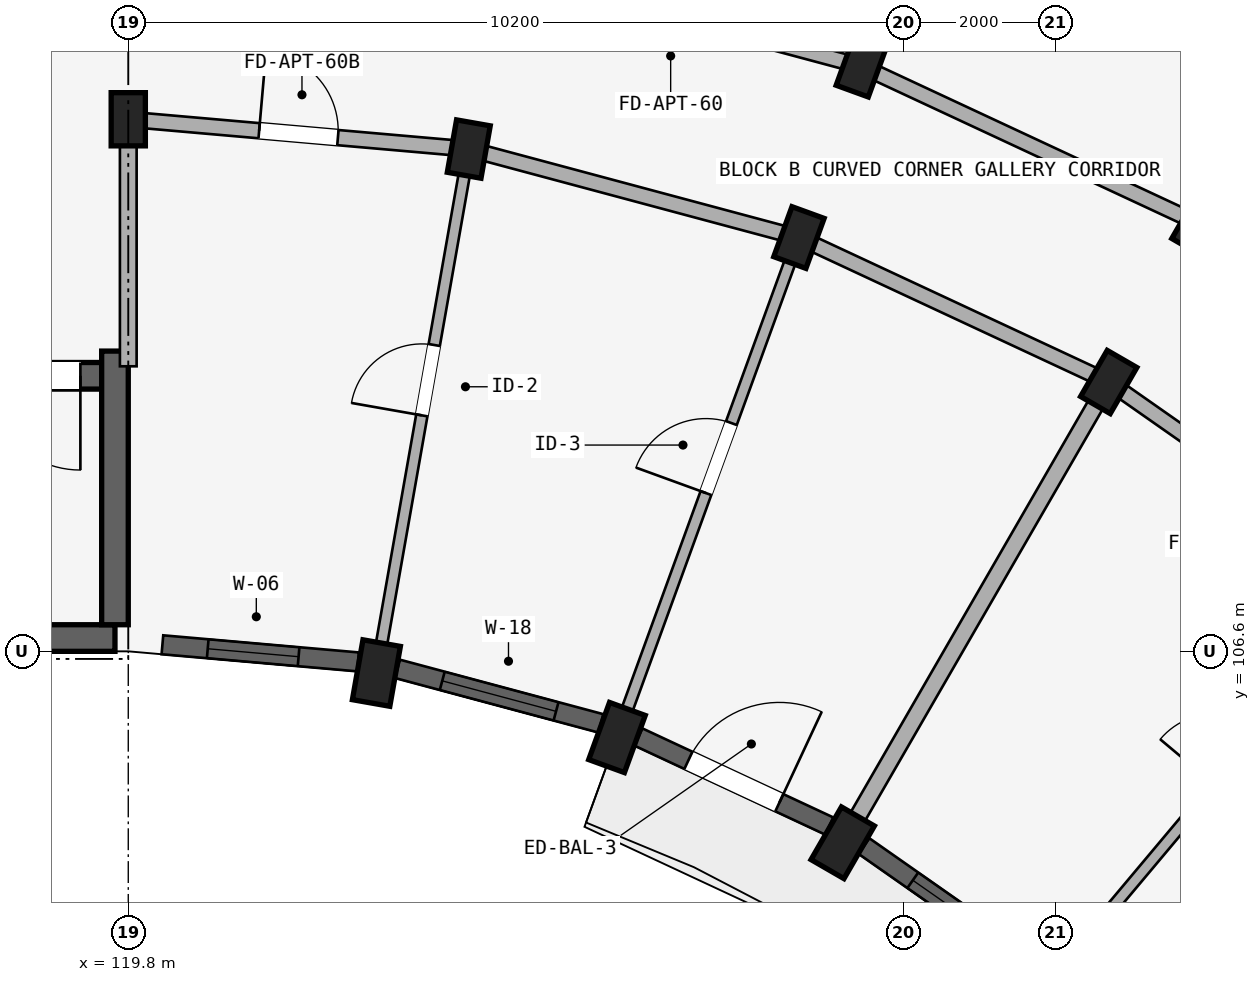
"""IFC4 building model, lengths in metres.
Left out: names, types, materials, properties, quantities, classifications, styles, units other than length and angle.
Written with IfcOpenShell. Run it as: python <this file> out.ifc"""

import sys

from ifc_helpers import new_model, si_unit, direction, frame, frame_2d, origin, origin_2d, place, context, subcontext, project, spatial, rectangle, extrude, element, fill, save


model = new_model("IFC4")
c1 = context("Model", 3, precision=1e-05, world=origin(), true_north=direction((0.0, 1.0)))
c2 = subcontext(c1, "Body", "Model", "MODEL_VIEW")
j1 = project(units=[si_unit("LENGTHUNIT", "METRE"), si_unit("PLANEANGLEUNIT", "RADIAN")], contexts=[c1])
p1 = place(None, origin())
s1 = spatial("IfcSite", under=j1, at=p1, CompositionType="ELEMENT")
p2 = place(p1, origin())
s2 = spatial("IfcBuilding", under=s1, at=p2, CompositionType="ELEMENT")
p3 = place(p2, frame((0.0, 0.0, 18.15)))
s3 = spatial("IfcBuildingStorey", under=s2, at=p3, CompositionType="ELEMENT", Elevation=18.15)
p4 = place(p3, frame((119.625, 106.775, 0.0), z_axis=(0.0, 0.0, 1.0), x_axis=(-1.0, 0.0, 0.0)))
e1 = element("IfcWall", 1, at=p4, inside=s3, PredefinedType="SHEAR", context=c2, shape_type="SweptSolid", body=[
    extrude(rectangle(XDim=8.25, YDim=0.35, at=frame_2d((4.125, 0.0))), origin(), (0.0, 0.0, 1.0), 2.93),
])
p5 = place(p3, frame((119.45, 110.225, 0.0), z_axis=(0.0, 0.0, 1.0), x_axis=(-1.0, 0.0, 0.0)))
e2 = element("IfcWall", 2, at=p5, inside=s3, PredefinedType="SHEAR", context=c2, shape_type="SweptSolid", body=[
    extrude(rectangle(XDim=7.9, YDim=0.35, at=frame_2d((3.95, 0.0))), origin(), (0.0, 0.0, 1.0), 2.93),
])
p6 = place(p5, frame((0.28, 0.0, 0.0)))
e3 = element("IfcOpeningElement", 3, at=p6, cuts=e2, PredefinedType="OPENING", context=c2, shape_type="SweptSolid", body=[
    extrude(rectangle(XDim=1.24, YDim=2.15, at=frame_2d((0.62, 1.075))), frame((0.0, 0.185, 0.0), z_axis=(0.0, -1.0, 0.0), x_axis=(1.0, 0.0, 0.0)), (0.0, 0.0, 1.0), 0.37),
])
p7 = place(p3, frame((119.625, 106.95, 0.0), z_axis=(0.0, 0.0, 1.0), x_axis=(0.0, 1.0, 0.0)))
e4 = element("IfcWall", 4, at=p7, inside=s3, PredefinedType="SHEAR", context=c2, shape_type="SweptSolid", body=[
    extrude(rectangle(XDim=3.6, YDim=0.35, at=frame_2d((1.8, 0.0))), origin(), (0.0, 0.0, 1.0), 2.93),
])
p8 = place(p3, frame((119.8, 113.6, 0.0), z_axis=(0.0, 0.0, 1.0), x_axis=(1.0, 0.0, 0.0)))
e5 = element("IfcColumn", 5, at=p8, inside=s3, PredefinedType="COLUMN", context=c2, shape_type="SweptSolid", body=[
    extrude(rectangle(XDim=0.45, YDim=0.7, at=origin_2d()), origin(), (0.0, 0.0, 1.0), 2.93),
])
p9 = place(p3, frame((123.065, 106.314, 0.0), z_axis=(0.0, 0.0, 1.0), x_axis=(-0.984807753012, 0.173648177667, 0.0)))
e6 = element("IfcColumn", 6, at=p9, inside=s3, PredefinedType="COLUMN", context=c2, shape_type="SweptSolid", body=[
    extrude(rectangle(XDim=0.5, YDim=0.8, at=origin_2d()), origin(), (0.0, 0.0, 1.0), 2.93),
])
p10 = place(p3, frame((124.28, 113.208, 0.0), z_axis=(0.0, 0.0, 1.0), x_axis=(-0.984807753012, 0.173648177667, 0.0)))
e7 = element("IfcColumn", 7, at=p10, inside=s3, PredefinedType="COLUMN", context=c2, shape_type="SweptSolid", body=[
    extrude(rectangle(XDim=0.45, YDim=0.7, at=origin_2d()), origin(), (0.0, 0.0, 1.0), 2.93),
])
p11 = place(p3, frame((126.23, 105.466, 0.0), z_axis=(0.0, 0.0, 1.0), x_axis=(-0.939692620786, 0.342020143326, 0.0)))
e8 = element("IfcColumn", 8, at=p11, inside=s3, PredefinedType="COLUMN", context=c2, shape_type="SweptSolid", body=[
    extrude(rectangle(XDim=0.5, YDim=0.8, at=origin_2d()), origin(), (0.0, 0.0, 1.0), 2.93),
])
for number, where, z_axis, x_axis in (
    (9, (128.624, 112.044, 0.0), (0.0, 0.0, 1.0), (-0.94, 0.342, 0.0)),
    (10, (129.445, 114.299, 0.0), (0.0, 0.0, 1.0), (-0.94, 0.342, 0.0)),
):
    element("IfcColumn", number, at=place(p3, frame(where, z_axis=z_axis, x_axis=x_axis)), inside=s3, PredefinedType="COLUMN", context=c2, shape_type="SweptSolid", body=[
        extrude(rectangle(XDim=0.45, YDim=0.7, at=origin_2d()), origin(), (0.0, 0.0, 1.0), 2.93),
    ])
p12 = place(p3, frame((129.2, 104.081, 0.0), z_axis=(0.0, 0.0, 1.0), x_axis=(-0.866025403784, 0.5, 0.0)))
e11 = element("IfcColumn", 11, at=p12, inside=s3, PredefinedType="COLUMN", context=c2, shape_type="SweptSolid", body=[
    extrude(rectangle(XDim=0.5, YDim=0.8, at=origin_2d()), origin(), (0.0, 0.0, 1.0), 2.93),
])
for number, where, z_axis, x_axis in (
    (12, (132.7, 110.144, 0.0), (0.0, 0.0, 1.0), (-0.866, 0.5, 0.0)),
    (13, (133.9, 112.222, 0.0), (0.0, 0.0, 1.0), (-0.866, 0.5, 0.0)),
):
    element("IfcColumn", number, at=place(p3, frame(where, z_axis=z_axis, x_axis=x_axis)), inside=s3, PredefinedType="COLUMN", context=c2, shape_type="SweptSolid", body=[
        extrude(rectangle(XDim=0.45, YDim=0.7, at=origin_2d()), origin(), (0.0, 0.0, 1.0), 2.93),
    ])
p13 = place(p3, frame((119.8, 113.6, 0.0), z_axis=(0.0, 0.0, 1.0), x_axis=(0.996191949488, -0.087187153726, 0.0)))
e14 = element("IfcWall", 14, at=p13, inside=s3, PredefinedType="STANDARD", context=c2, shape_type="SweptSolid", body=[
    extrude(rectangle(XDim=4.497, YDim=0.2, at=frame_2d((2.249, 0.0))), origin(), (0.0, 0.0, 1.0), 2.372),
])
p14 = place(p13, frame((1.729, 0.0, 0.0)))
e15 = element("IfcOpeningElement", 15, at=p14, cuts=e14, PredefinedType="OPENING", context=c2, shape_type="SweptSolid", body=[
    extrude(rectangle(XDim=1.04, YDim=2.15, at=frame_2d((0.52, 1.075))), frame((0.0, 0.11, 0.0), z_axis=(0.0, -1.0, 0.0), x_axis=(1.0, 0.0, 0.0)), (0.0, 0.0, 1.0), 0.22),
])
p15 = place(p3, frame((124.28, 113.208, 0.0), z_axis=(0.0, 0.0, 1.0), x_axis=(0.965934240054, -0.258787642463, 0.0)))
e16 = element("IfcWall", 16, at=p15, inside=s3, PredefinedType="STANDARD", context=c2, shape_type="SweptSolid", body=[
    extrude(rectangle(XDim=4.497, YDim=0.2, at=frame_2d((2.249, 0.0))), origin(), (0.0, 0.0, 1.0), 2.372),
])
p16 = place(p3, frame((124.697, 115.572, 0.0), z_axis=(0.0, 0.0, 1.0), x_axis=(0.965930095386, -0.258803112091, 0.0)))
e17 = element("IfcWall", 17, at=p16, inside=s3, PredefinedType="STANDARD", context=c2, shape_type="SweptSolid", body=[
    extrude(rectangle(XDim=4.916, YDim=0.2, at=frame_2d((2.458, 0.0))), origin(), (0.0, 0.0, 1.0), 2.372),
])
p17 = place(p16, frame((1.958, 0.0, 0.0)))
e18 = element("IfcOpeningElement", 18, at=p17, cuts=e17, PredefinedType="OPENING", context=c2, shape_type="SweptSolid", body=[
    extrude(rectangle(XDim=1.0, YDim=2.15, at=frame_2d((0.5, 1.075))), frame((0.0, 0.11, 0.0), z_axis=(0.0, -1.0, 0.0), x_axis=(1.0, 0.0, 0.0)), (0.0, 0.0, 1.0), 0.22),
])
p18 = place(p3, frame((128.624, 112.044, 0.0), z_axis=(0.0, 0.0, 1.0), x_axis=(0.906307919131, -0.422617978463, 0.0)))
e19 = element("IfcWall", 19, at=p18, inside=s3, PredefinedType="STANDARD", context=c2, shape_type="SweptSolid", body=[
    extrude(rectangle(XDim=4.497, YDim=0.2, at=frame_2d((2.249, 0.0))), origin(), (0.0, 0.0, 1.0), 2.372),
])
p19 = place(p3, frame((129.445, 114.299, 0.0), z_axis=(0.0, 0.0, 1.0), x_axis=(0.906302381024, -0.422629854778, 0.0)))
e20 = element("IfcWall", 20, at=p19, inside=s3, PredefinedType="STANDARD", context=c2, shape_type="SweptSolid", body=[
    extrude(rectangle(XDim=4.915, YDim=0.2, at=frame_2d((2.458, 0.0))), origin(), (0.0, 0.0, 1.0), 2.372),
])
p20 = place(p3, frame((132.7, 110.144, 0.0), z_axis=(0.0, 0.0, 1.0), x_axis=(0.819155404658, -0.573571637217, 0.0)))
e21 = element("IfcWall", 21, at=p20, inside=s3, PredefinedType="STANDARD", context=c2, shape_type="SweptSolid", body=[
    extrude(rectangle(XDim=4.497, YDim=0.2, at=frame_2d((2.249, 0.0))), origin(), (0.0, 0.0, 1.0), 2.372),
])
p21 = place(p20, frame((1.709, 0.0, 0.0)))
e22 = element("IfcOpeningElement", 22, at=p21, cuts=e21, PredefinedType="OPENING", context=c2, shape_type="SweptSolid", body=[
    extrude(rectangle(XDim=1.08, YDim=2.15, at=frame_2d((0.54, 1.075))), frame((0.0, 0.11, 0.0), z_axis=(0.0, -1.0, 0.0), x_axis=(1.0, 0.0, 0.0)), (0.0, 0.0, 1.0), 0.22),
])
p22 = place(p3, frame((119.8, 110.35, 0.0), z_axis=(0.0, 0.0, 1.0), x_axis=(0.0, 1.0, 0.0)))
e23 = element("IfcWall", 23, at=p22, inside=s3, PredefinedType="STANDARD", context=c2, shape_type="SweptSolid", body=[
    extrude(rectangle(XDim=3.2, YDim=0.22, at=frame_2d((1.6, 0.0))), origin(), (0.0, 0.0, 1.0), 2.372),
])
p23 = place(p3, frame((123.099, 106.511, 0.0), z_axis=(0.0, 0.0, 1.0), x_axis=(0.173647089161, 0.984807944945, 0.0)))
e24 = element("IfcWall", 24, at=p23, inside=s3, PredefinedType="PARTITIONING", context=c2, shape_type="SweptSolid", body=[
    extrude(rectangle(XDim=6.75, YDim=0.15, at=frame_2d((3.375, 0.0))), origin(), (0.0, 0.0, 1.0), 2.372),
])
p24 = place(p23, frame((3.242, 0.0, 0.0)))
e25 = element("IfcOpeningElement", 25, at=p24, cuts=e24, PredefinedType="OPENING", context=c2, shape_type="SweptSolid", body=[
    extrude(rectangle(XDim=0.94, YDim=2.1, at=frame_2d((0.47, 1.05))), frame((0.0, 0.085, 0.0), z_axis=(0.0, -1.0, 0.0), x_axis=(1.0, 0.0, 0.0)), (0.0, 0.0, 1.0), 0.17),
])
p25 = place(p3, frame((126.298, 105.654, 0.0), z_axis=(0.0, 0.0, 1.0), x_axis=(0.342010221662, 0.939696231917, 0.0)))
e26 = element("IfcWall", 26, at=p25, inside=s3, PredefinedType="PARTITIONING", context=c2, shape_type="SweptSolid", body=[
    extrude(rectangle(XDim=6.75, YDim=0.15, at=frame_2d((3.375, 0.0))), origin(), (0.0, 0.0, 1.0), 2.372),
])
p26 = place(p25, frame((3.222, 0.0, 0.0)))
e27 = element("IfcOpeningElement", 27, at=p26, cuts=e26, PredefinedType="OPENING", context=c2, shape_type="SweptSolid", body=[
    extrude(rectangle(XDim=0.98, YDim=2.12, at=frame_2d((0.49, 1.06))), frame((0.0, 0.085, 0.0), z_axis=(0.0, -1.0, 0.0), x_axis=(1.0, 0.0, 0.0)), (0.0, 0.0, 1.0), 0.17),
])
p27 = place(p3, frame((129.479, 114.393, 0.0), z_axis=(0.0, 0.0, 1.0), x_axis=(0.342022120477, 0.939691901159, 0.0)))
e28 = element("IfcWall", 28, at=p27, inside=s3, PredefinedType="PARTITIONING", context=c2, shape_type="SweptSolid", body=[
    extrude(rectangle(XDim=17.42, YDim=0.15, at=frame_2d((8.71, 0.0))), origin(), (0.0, 0.0, 1.0), 2.372),
])
p28 = place(p27, frame((4.45, 0.0, 0.0)))
e29 = element("IfcOpeningElement", 29, at=p28, cuts=e28, PredefinedType="OPENING", context=c2, shape_type="SweptSolid", body=[
    extrude(rectangle(XDim=0.8, YDim=2.1, at=frame_2d((0.4, 1.05))), frame((0.0, 0.085, 0.0), z_axis=(0.0, -1.0, 0.0), x_axis=(1.0, 0.0, 0.0)), (0.0, 0.0, 1.0), 0.17),
])
p29 = place(p3, frame((129.3, 104.254, 0.0), z_axis=(0.0, 0.0, 1.0), x_axis=(0.499997969693, 0.866026575979, 0.0)))
e30 = element("IfcWall", 30, at=p29, inside=s3, PredefinedType="STANDARD", context=c2, shape_type="SweptSolid", body=[
    extrude(rectangle(XDim=6.75, YDim=0.22, at=frame_2d((3.375, 0.0))), origin(), (0.0, 0.0, 1.0), 2.372),
])
p30 = place(p3, frame((132.013, 102.355, 0.0), z_axis=(0.0, 0.0, 1.0), x_axis=(0.642784846501, 0.766046761698, 0.0)))
e31 = element("IfcWall", 31, at=p30, inside=s3, PredefinedType="PARTITIONING", context=c2, shape_type="SweptSolid", body=[
    extrude(rectangle(XDim=6.75, YDim=0.15, at=frame_2d((3.375, 0.0))), origin(), (0.0, 0.0, 1.0), 2.372),
])
p31 = place(p30, frame((3.242, 0.0, 0.0)))
e32 = element("IfcOpeningElement", 32, at=p31, cuts=e31, PredefinedType="OPENING", context=c2, shape_type="SweptSolid", body=[
    extrude(rectangle(XDim=0.94, YDim=2.1, at=frame_2d((0.47, 1.05))), frame((0.0, 0.085, 0.0), z_axis=(0.0, -1.0, 0.0), x_axis=(1.0, 0.0, 0.0)), (0.0, 0.0, 1.0), 0.17),
])
p32 = place(p3, frame((120.249, 106.686, 0.0), z_axis=(0.0, 0.0, 1.0), x_axis=(0.996188278786, -0.087229084652, 0.0)))
e33 = element("IfcWall", 33, at=p32, inside=s3, PredefinedType="STANDARD", context=c2, shape_type="SweptSolid", body=[
    extrude(rectangle(XDim=2.583, YDim=0.25, at=frame_2d((1.292, 0.0))), origin(), (0.0, 0.0, 1.0), 2.422),
])
p33 = place(p32, frame((0.599, 0.0, 0.722)))
e34 = element("IfcOpeningElement", 34, at=p33, cuts=e33, PredefinedType="OPENING", context=c2, shape_type="SweptSolid", body=[
    extrude(rectangle(XDim=1.2, YDim=1.5, at=frame_2d((0.6, 0.75))), frame((0.0, 0.135, 0.0), z_axis=(0.0, -1.0, 0.0), x_axis=(1.0, 0.0, 0.0)), (0.0, 0.0, 1.0), 0.27),
])
p34 = place(p3, frame((123.342, 106.369, 0.0), z_axis=(0.0, 0.0, 1.0), x_axis=(0.965935855992, -0.25878161084, 0.0)))
e35 = element("IfcWall", 35, at=p34, inside=s3, PredefinedType="STANDARD", context=c2, shape_type="SweptSolid", body=[
    extrude(rectangle(XDim=2.77, YDim=0.25, at=frame_2d((1.385, 0.0))), origin(), (0.0, 0.0, 1.0), 2.422),
])
p35 = place(p34, frame((0.61, 0.0, 0.622)))
e36 = element("IfcOpeningElement", 36, at=p35, cuts=e35, PredefinedType="OPENING", context=c2, shape_type="SweptSolid", body=[
    extrude(rectangle(XDim=1.55, YDim=1.6, at=frame_2d((0.775, 0.8))), frame((0.0, 0.135, 0.0), z_axis=(0.0, -1.0, 0.0), x_axis=(1.0, 0.0, 0.0)), (0.0, 0.0, 1.0), 0.27),
])
p36 = place(p3, frame((126.513, 105.472, 0.0), z_axis=(0.0, 0.0, 1.0), x_axis=(0.906293449611, -0.422649007088, 0.0)))
e37 = element("IfcWall", 37, at=p36, inside=s3, PredefinedType="STANDARD", context=c2, shape_type="SweptSolid", body=[
    extrude(rectangle(XDim=2.77, YDim=0.25, at=frame_2d((1.385, 0.0))), origin(), (0.0, 0.0, 1.0), 2.422),
])
p37 = place(p36, frame((0.725, 0.0, 0.0)))
e38 = element("IfcOpeningElement", 38, at=p37, cuts=e37, PredefinedType="OPENING", context=c2, shape_type="SweptSolid", body=[
    extrude(rectangle(XDim=1.32, YDim=2.15, at=frame_2d((0.66, 1.075))), frame((0.0, 0.135, 0.0), z_axis=(0.0, -1.0, 0.0), x_axis=(1.0, 0.0, 0.0)), (0.0, 0.0, 1.0), 0.27),
])
p38 = place(p3, frame((129.479, 104.038, 0.0), z_axis=(0.0, 0.0, 1.0), x_axis=(0.819111815273, -0.573633885053, 0.0)))
e39 = element("IfcWall", 39, at=p38, inside=s3, PredefinedType="STANDARD", context=c2, shape_type="SweptSolid", body=[
    extrude(rectangle(XDim=2.77, YDim=0.25, at=frame_2d((1.385, 0.0))), origin(), (0.0, 0.0, 1.0), 2.422),
])
p39 = place(p38, frame((0.785, 0.0, 0.722)))
e40 = element("IfcOpeningElement", 40, at=p39, cuts=e39, PredefinedType="OPENING", context=c2, shape_type="SweptSolid", body=[
    extrude(rectangle(XDim=1.2, YDim=1.5, at=frame_2d((0.6, 0.75))), frame((0.0, 0.135, 0.0), z_axis=(0.0, -1.0, 0.0), x_axis=(1.0, 0.0, 0.0)), (0.0, 0.0, 1.0), 0.27),
])
p40 = place(p33, origin())
e41 = element("IfcWindow", 41, at=p40, inside=s3, PartitioningType="SINGLE_PANEL", PredefinedType="WINDOW", context=c2, shape_type="SweptSolid", body=[
    extrude(rectangle(XDim=1.2, YDim=1.5, at=frame_2d((0.6, 0.75))), frame((0.0, 0.03, 0.0), z_axis=(0.0, -1.0, 0.0), x_axis=(1.0, 0.0, 0.0)), (0.0, 0.0, 1.0), 0.06),
])
fill(e34, e41)
p41 = place(p35, origin())
e42 = element("IfcWindow", 42, at=p41, inside=s3, PartitioningType="DOUBLE_PANEL_VERTICAL", PredefinedType="WINDOW", context=c2, shape_type="SweptSolid", body=[
    extrude(rectangle(XDim=1.55, YDim=1.6, at=frame_2d((0.775, 0.8))), frame((0.0, 0.03, 0.0), z_axis=(0.0, -1.0, 0.0), x_axis=(1.0, 0.0, 0.0)), (0.0, 0.0, 1.0), 0.06),
])
fill(e36, e42)
p42 = place(p39, origin())
e43 = element("IfcWindow", 43, at=p42, inside=s3, PartitioningType="SINGLE_PANEL", PredefinedType="WINDOW", context=c2, shape_type="SweptSolid", body=[
    extrude(rectangle(XDim=1.2, YDim=1.5, at=frame_2d((0.6, 0.75))), frame((0.0, 0.03, 0.0), z_axis=(0.0, -1.0, 0.0), x_axis=(1.0, 0.0, 0.0)), (0.0, 0.0, 1.0), 0.06),
])
fill(e40, e43)
p43 = place(p6, origin())
e44 = element("IfcDoor", 44, at=p43, inside=s3, OperationType="SINGLE_SWING_LEFT", PredefinedType="DOOR", context=c2, shape_type="SweptSolid", body=[
    extrude(rectangle(XDim=1.24, YDim=2.15, at=frame_2d((0.62, 1.075))), frame((0.0, 0.025, 0.0), z_axis=(0.0, -1.0, 0.0), x_axis=(1.0, 0.0, 0.0)), (0.0, 0.0, 1.0), 0.05),
])
fill(e3, e44)
p44 = place(p24, origin())
e45 = element("IfcDoor", 45, at=p44, inside=s3, OperationType="SINGLE_SWING_LEFT", PredefinedType="DOOR", context=c2, shape_type="SweptSolid", body=[
    extrude(rectangle(XDim=0.94, YDim=2.1, at=frame_2d((0.47, 1.05))), frame((0.0, 0.025, 0.0), z_axis=(0.0, -1.0, 0.0), x_axis=(1.0, 0.0, 0.0)), (0.0, 0.0, 1.0), 0.05),
])
fill(e25, e45)
p45 = place(p26, frame((0.98, 0.0, 0.0), z_axis=(0.0, 0.0, 1.0), x_axis=(-1.0, 0.0, 0.0)))
e46 = element("IfcDoor", 46, at=p45, inside=s3, OperationType="SINGLE_SWING_RIGHT", PredefinedType="DOOR", context=c2, shape_type="SweptSolid", body=[
    extrude(rectangle(XDim=0.98, YDim=2.12, at=frame_2d((0.49, 1.06))), frame((0.0, 0.025, 0.0), z_axis=(0.0, -1.0, 0.0), x_axis=(1.0, 0.0, 0.0)), (0.0, 0.0, 1.0), 0.05),
])
fill(e27, e46)
p46 = place(p14, frame((1.04, 0.0, 0.0), z_axis=(0.0, 0.0, 1.0), x_axis=(-1.0, 0.0, 0.0)))
e47 = element("IfcDoor", 47, at=p46, inside=s3, OperationType="SINGLE_SWING_RIGHT", PredefinedType="DOOR", context=c2, shape_type="SweptSolid", body=[
    extrude(rectangle(XDim=1.04, YDim=2.15, at=frame_2d((0.52, 1.075))), frame((0.0, 0.025, 0.0), z_axis=(0.0, -1.0, 0.0), x_axis=(1.0, 0.0, 0.0)), (0.0, 0.0, 1.0), 0.05),
])
fill(e15, e47)
p47 = place(p37, frame((1.32, 0.0, 0.0), z_axis=(0.0, 0.0, 1.0), x_axis=(-1.0, 0.0, 0.0)))
e48 = element("IfcDoor", 48, at=p47, inside=s3, OperationType="SINGLE_SWING_LEFT", PredefinedType="DOOR", context=c2, shape_type="SweptSolid", body=[
    extrude(rectangle(XDim=1.32, YDim=2.15, at=frame_2d((0.66, 1.075))), frame((0.0, 0.025, 0.0), z_axis=(0.0, -1.0, 0.0), x_axis=(1.0, 0.0, 0.0)), (0.0, 0.0, 1.0), 0.05),
])
fill(e38, e48)
save(model, sys.argv[1])
